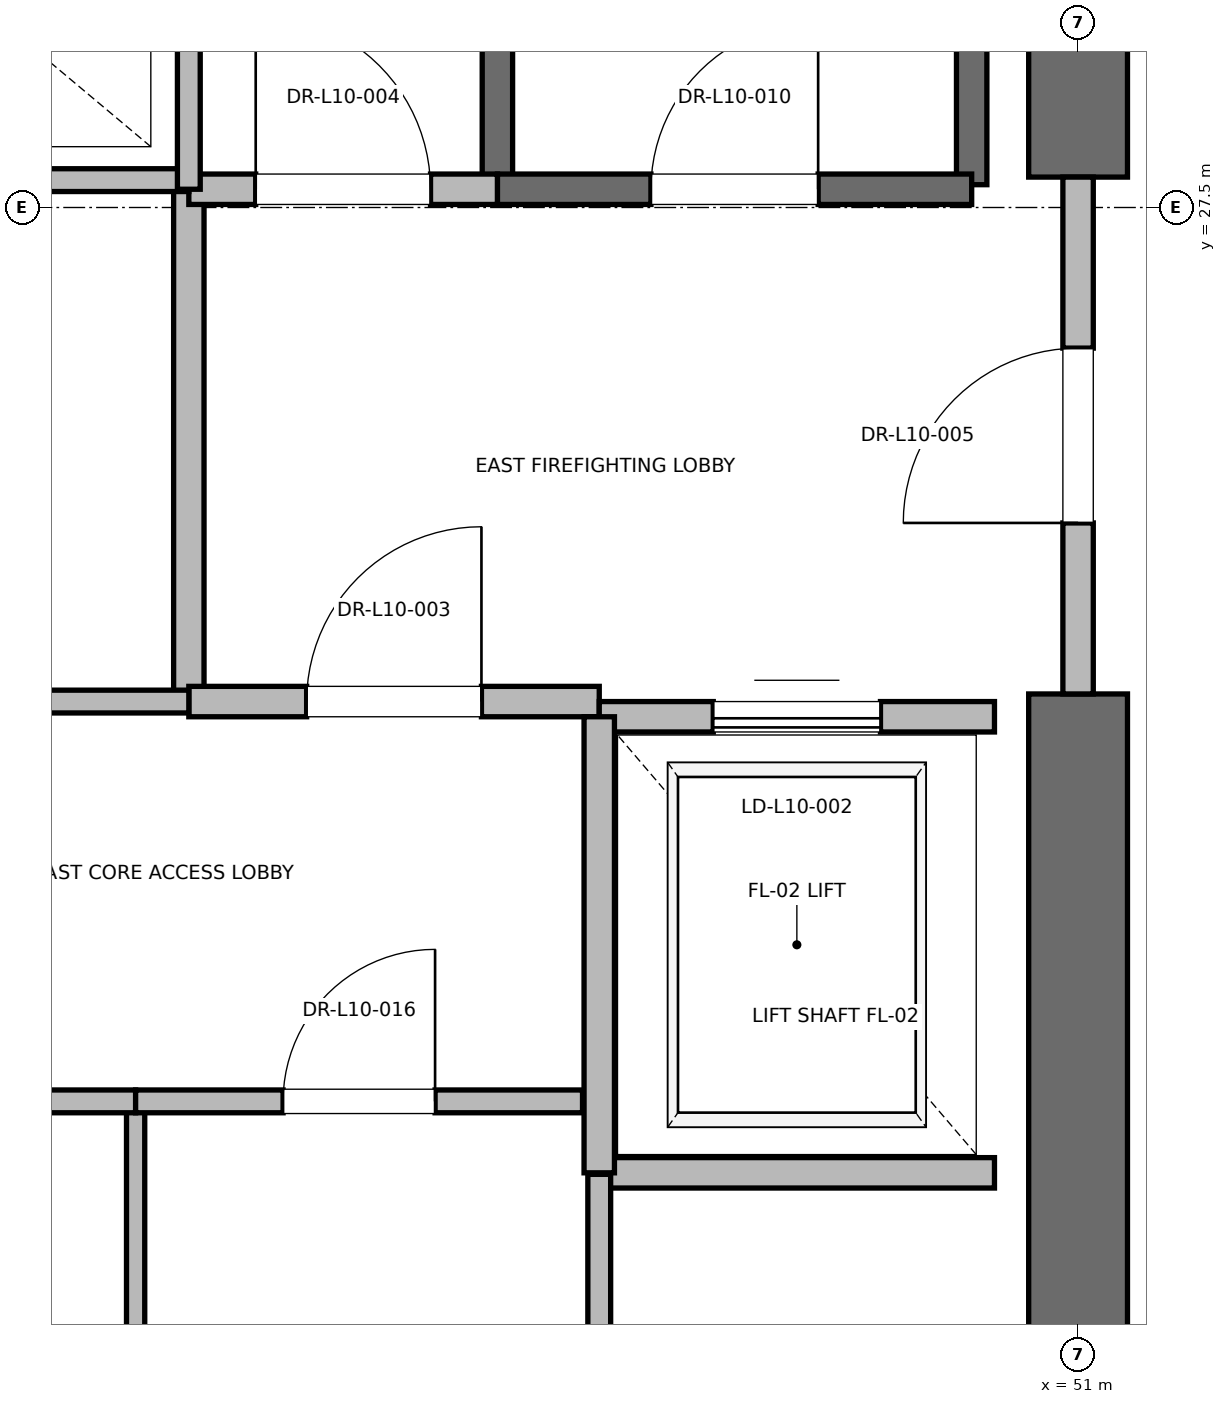
"""IFC4 building model, lengths in metres.
Left out: names, types, materials, properties, quantities, classifications, styles, units other than length and angle.
Written with IfcOpenShell. Run it as: python <this file> out.ifc"""

import sys

from ifc_helpers import new_model, si_unit, direction, frame, frame_2d, origin, place, context, subcontext, project, spatial, rectangle, extrude, element, fill, save


model = new_model("IFC4")
c1 = context("Model", 3, precision=1e-05, world=origin(), true_north=direction((0.0, 1.0)))
c2 = subcontext(c1, "Body", "Model", "MODEL_VIEW")
j1 = project(units=[si_unit("LENGTHUNIT", "METRE"), si_unit("PLANEANGLEUNIT", "RADIAN")], contexts=[c1])
p1 = place(None, origin())
s1 = spatial("IfcSite", under=j1, at=p1, CompositionType="ELEMENT")
p2 = place(p1, origin())
s2 = spatial("IfcBuilding", under=s1, at=p2, CompositionType="ELEMENT")
p3 = place(p2, frame((0.0, 0.0, 47.6)))
s3 = spatial("IfcBuildingStorey", under=s2, at=p3, CompositionType="ELEMENT", Elevation=47.6)
p4 = place(p3, frame((51.0, 18.5, 0.0), z_axis=(0.0, 0.0, 1.0), x_axis=(0.0, 1.0, 0.0)))
e1 = element("IfcWall", 1, at=p4, inside=s3, PredefinedType="SHEAR", context=c2, shape_type="SweptSolid", body=[
    extrude(rectangle(XDim=5.8, YDim=0.65, at=frame_2d((2.9, 0.0))), origin(), (0.0, 0.0, 1.0), 3.76),
])
p5 = place(p3, frame((51.0, 27.7, 0.0), z_axis=(0.0, 0.0, 1.0), x_axis=(0.0, 1.0, 0.0)))
e2 = element("IfcWall", 2, at=p5, inside=s3, PredefinedType="SHEAR", context=c2, shape_type="SweptSolid", body=[
    extrude(rectangle(XDim=8.8, YDim=0.65, at=frame_2d((4.4, 0.0))), origin(), (0.0, 0.0, 1.0), 3.76),
])
p6 = place(p3, frame((50.3, 27.65, 0.0), z_axis=(0.0, 0.0, 1.0), x_axis=(0.0, 1.0, 0.0)))
e3 = element("IfcWall", 3, at=p6, inside=s3, PredefinedType="SOLIDWALL", context=c2, shape_type="SweptSolid", body=[
    extrude(rectangle(XDim=8.15, YDim=0.2, at=frame_2d((4.075, 0.0))), origin(), (0.0, 0.0, 1.0), 3.76),
])
p7 = place(p3, frame((47.18, 27.62, 0.0), z_axis=(0.0, 0.0, 1.0), x_axis=(0.0, 1.0, 0.0)))
e4 = element("IfcWall", 4, at=p7, inside=s3, PredefinedType="SOLIDWALL", context=c2, shape_type="SweptSolid", body=[
    extrude(rectangle(XDim=8.18, YDim=0.2, at=frame_2d((4.09, 0.0))), origin(), (0.0, 0.0, 1.0), 3.76),
])
p8 = place(p3, frame((47.18, 27.62, 0.0), z_axis=(0.0, 0.0, 1.0), x_axis=(1.0, 0.0, 0.0)))
e5 = element("IfcWall", 5, at=p8, inside=s3, PredefinedType="SOLIDWALL", context=c2, shape_type="SweptSolid", body=[
    extrude(rectangle(XDim=3.12, YDim=0.2, at=frame_2d((1.56, 0.0))), origin(), (0.0, 0.0, 1.0), 3.76),
])
p9 = place(p8, frame((1.01, 0.0, 0.0)))
e6 = element("IfcOpeningElement", 6, at=p9, cuts=e5, PredefinedType="OPENING", context=c2, shape_type="SweptSolid", body=[
    extrude(rectangle(XDim=1.1, YDim=2.15, at=frame_2d((0.55, 1.075))), frame((0.0, 0.1, 0.0), z_axis=(0.0, -1.0, 0.0), x_axis=(1.0, 0.0, 0.0)), (0.0, 0.0, 1.0), 0.2),
])
p10 = place(p3, frame((45.15, 24.25, 0.0), z_axis=(0.0, 0.0, 1.0), x_axis=(0.0, 1.0, 0.0)))
e7 = element("IfcWall", 7, at=p10, inside=s3, PredefinedType="PARTITIONING", context=c2, shape_type="SweptSolid", body=[
    extrude(rectangle(XDim=3.37, YDim=0.2, at=frame_2d((1.685, 0.0))), origin(), (0.0, 0.0, 1.0), 3.76),
])
p11 = place(p3, frame((45.15, 24.25, 0.0), z_axis=(0.0, 0.0, 1.0), x_axis=(1.0, 0.0, 0.0)))
e8 = element("IfcWall", 8, at=p11, inside=s3, PredefinedType="PARTITIONING", context=c2, shape_type="SweptSolid", body=[
    extrude(rectangle(XDim=2.7, YDim=0.2, at=frame_2d((1.35, 0.0))), origin(), (0.0, 0.0, 1.0), 3.76),
])
p12 = place(p11, frame((0.775, 0.0, 0.0)))
e9 = element("IfcOpeningElement", 9, at=p12, cuts=e8, PredefinedType="OPENING", context=c2, shape_type="SweptSolid", body=[
    extrude(rectangle(XDim=1.15, YDim=2.2, at=frame_2d((0.575, 1.1))), frame((0.0, 0.1, 0.0), z_axis=(0.0, -1.0, 0.0), x_axis=(1.0, 0.0, 0.0)), (0.0, 0.0, 1.0), 0.2),
])
p13 = place(p3, frame((45.15, 27.62, 0.0), z_axis=(0.0, 0.0, 1.0), x_axis=(1.0, 0.0, 0.0)))
e10 = element("IfcWall", 10, at=p13, inside=s3, PredefinedType="PARTITIONING", context=c2, shape_type="SweptSolid", body=[
    extrude(rectangle(XDim=2.03, YDim=0.2, at=frame_2d((1.015, 0.0))), origin(), (0.0, 0.0, 1.0), 3.76),
])
p14 = place(p13, frame((0.44, 0.0, 0.0)))
e11 = element("IfcOpeningElement", 11, at=p14, cuts=e10, PredefinedType="OPENING", context=c2, shape_type="SweptSolid", body=[
    extrude(rectangle(XDim=1.15, YDim=2.2, at=frame_2d((0.575, 1.1))), frame((0.0, 0.1, 0.0), z_axis=(0.0, -1.0, 0.0), x_axis=(1.0, 0.0, 0.0)), (0.0, 0.0, 1.0), 0.2),
])
p15 = place(p3, frame((51.0, 24.3, 0.0), z_axis=(0.0, 0.0, 1.0), x_axis=(0.0, 1.0, 0.0)))
e12 = element("IfcWall", 12, at=p15, inside=s3, PredefinedType="PARTITIONING", context=c2, shape_type="SweptSolid", body=[
    extrude(rectangle(XDim=3.4, YDim=0.2, at=frame_2d((1.7, 0.0))), origin(), (0.0, 0.0, 1.0), 2.54),
])
p16 = place(p15, frame((1.125, 0.0, 0.0)))
e13 = element("IfcOpeningElement", 13, at=p16, cuts=e12, PredefinedType="OPENING", context=c2, shape_type="SweptSolid", body=[
    extrude(rectangle(XDim=1.15, YDim=2.2, at=frame_2d((0.575, 1.1))), frame((0.0, 0.1, 0.0), z_axis=(0.0, -1.0, 0.0), x_axis=(1.0, 0.0, 0.0)), (0.0, 0.0, 1.0), 0.2),
])
p17 = place(p3, frame((47.85, 21.15, 0.0), z_axis=(0.0, 0.0, 1.0), x_axis=(1.0, 0.0, 0.0)))
e14 = element("IfcWall", 14, at=p17, inside=s3, PredefinedType="SOLIDWALL", context=c2, shape_type="SweptSolid", body=[
    extrude(rectangle(XDim=2.6, YDim=0.2, at=frame_2d((1.3, 0.0))), origin(), (0.0, 0.0, 1.0), 3.76),
])
p18 = place(p3, frame((50.45, 24.15, 0.0), z_axis=(0.0, 0.0, 1.0), x_axis=(-1.0, 0.0, 0.0)))
e15 = element("IfcWall", 15, at=p18, inside=s3, PredefinedType="SOLIDWALL", context=c2, shape_type="SweptSolid", body=[
    extrude(rectangle(XDim=2.6, YDim=0.2, at=frame_2d((1.3, 0.0))), origin(), (0.0, 0.0, 1.0), 2.54),
])
p19 = place(p18, frame((0.75, 0.0, 0.0)))
e16 = element("IfcOpeningElement", 16, at=p19, cuts=e15, PredefinedType="OPENING", context=c2, shape_type="SweptSolid", body=[
    extrude(rectangle(XDim=1.1, YDim=2.2, at=frame_2d((0.55, 1.1))), frame((0.0, 0.1, 0.0), z_axis=(0.0, -1.0, 0.0), x_axis=(1.0, 0.0, 0.0)), (0.0, 0.0, 1.0), 0.2),
])
p20 = place(p3, frame((47.85, 24.15, 0.0), z_axis=(0.0, 0.0, 1.0), x_axis=(0.0, -1.0, 0.0)))
e17 = element("IfcWall", 17, at=p20, inside=s3, PredefinedType="SOLIDWALL", context=c2, shape_type="SweptSolid", body=[
    extrude(rectangle(XDim=3.0, YDim=0.2, at=frame_2d((1.5, 0.0))), origin(), (0.0, 0.0, 1.0), 3.76),
])
p21 = place(p3, frame((41.56, 27.68, 0.0), z_axis=(0.0, 0.0, 1.0), x_axis=(1.0, 0.0, 0.0)))
e18 = element("IfcWall", 18, at=p21, inside=s3, PredefinedType="PARTITIONING", context=c2, shape_type="SweptSolid", body=[
    extrude(rectangle(XDim=3.59, YDim=0.15, at=frame_2d((1.795, 0.0))), origin(), (0.0, 0.0, 1.0), 2.85),
])
p22 = place(p3, frame((47.85, 18.6, 0.0), z_axis=(0.0, 0.0, 1.0), x_axis=(0.0, 1.0, 0.0)))
e19 = element("IfcWall", 19, at=p22, inside=s3, PredefinedType="PARTITIONING", context=c2, shape_type="SweptSolid", body=[
    extrude(rectangle(XDim=2.54, YDim=0.15, at=frame_2d((1.27, 0.0))), origin(), (0.0, 0.0, 1.0), 2.85),
])
p23 = place(p3, frame((44.8, 18.6, 0.0), z_axis=(0.0, 0.0, 1.0), x_axis=(0.0, 1.0, 0.0)))
e20 = element("IfcWall", 20, at=p23, inside=s3, PredefinedType="PARTITIONING", context=c2, shape_type="SweptSolid", body=[
    extrude(rectangle(XDim=3.02, YDim=0.12, at=frame_2d((1.51, 0.0))), origin(), (0.0, 0.0, 1.0), 2.85),
])
p24 = place(p3, frame((41.76, 21.62, 0.0), z_axis=(0.0, 0.0, 1.0), x_axis=(1.0, 0.0, 0.0)))
e21 = element("IfcWall", 21, at=p24, inside=s3, PredefinedType="PARTITIONING", context=c2, shape_type="SweptSolid", body=[
    extrude(rectangle(XDim=3.04, YDim=0.15, at=frame_2d((1.52, 0.0))), origin(), (0.0, 0.0, 1.0), 2.85),
])
p25 = place(p24, frame((1.02, 0.0, 0.0)))
e22 = element("IfcOpeningElement", 22, at=p25, cuts=e21, PredefinedType="OPENING", context=c2, shape_type="SweptSolid", body=[
    extrude(rectangle(XDim=1.0, YDim=2.15, at=frame_2d((0.5, 1.075))), frame((0.0, 0.075, 0.0), z_axis=(0.0, -1.0, 0.0), x_axis=(1.0, 0.0, 0.0)), (0.0, 0.0, 1.0), 0.15),
])
p26 = place(p3, frame((44.8, 21.62, 0.0), z_axis=(0.0, 0.0, 1.0), x_axis=(1.0, 0.0, 0.0)))
e23 = element("IfcWall", 23, at=p26, inside=s3, PredefinedType="PARTITIONING", context=c2, shape_type="SweptSolid", body=[
    extrude(rectangle(XDim=2.94, YDim=0.15, at=frame_2d((1.47, 0.0))), origin(), (0.0, 0.0, 1.0), 2.85),
])
p27 = place(p26, frame((0.97, 0.0, 0.0)))
e24 = element("IfcOpeningElement", 24, at=p27, cuts=e23, PredefinedType="OPENING", context=c2, shape_type="SweptSolid", body=[
    extrude(rectangle(XDim=1.0, YDim=2.15, at=frame_2d((0.5, 1.075))), frame((0.0, 0.075, 0.0), z_axis=(0.0, -1.0, 0.0), x_axis=(1.0, 0.0, 0.0)), (0.0, 0.0, 1.0), 0.15),
])
p28 = place(p3, frame((41.76, 24.25, 0.0), z_axis=(0.0, 0.0, 1.0), x_axis=(1.0, 0.0, 0.0)))
e25 = element("IfcWall", 25, at=p28, inside=s3, PredefinedType="PARTITIONING", context=c2, shape_type="SweptSolid", body=[
    extrude(rectangle(XDim=3.39, YDim=0.15, at=frame_2d((1.695, 0.0))), origin(), (0.0, 0.0, 1.0), 2.85),
])
p29 = place(p28, frame((1.255, 0.0, 0.0)))
e26 = element("IfcOpeningElement", 26, at=p29, cuts=e25, PredefinedType="OPENING", context=c2, shape_type="SweptSolid", body=[
    extrude(rectangle(XDim=0.88, YDim=2.1, at=frame_2d((0.44, 1.05))), frame((0.0, 0.075, 0.0), z_axis=(0.0, -1.0, 0.0), x_axis=(1.0, 0.0, 0.0)), (0.0, 0.0, 1.0), 0.15),
])
p30 = place(p3, frame((45.15, 27.62, 0.0), z_axis=(0.0, 0.0, 1.0), x_axis=(0.0, 1.0, 0.0)))
e27 = element("IfcWall", 27, at=p30, inside=s3, PredefinedType="PARTITIONING", context=c2, shape_type="SweptSolid", body=[
    extrude(rectangle(XDim=3.1, YDim=0.15, at=frame_2d((1.55, 0.0))), origin(), (0.0, 0.0, 1.0), 2.85),
])
p31 = place(p9, origin())
e28 = element("IfcDoor", 28, at=p31, inside=s3, OperationType="SINGLE_SWING_RIGHT", PredefinedType="DOOR", context=c2, shape_type="SweptSolid", body=[
    extrude(rectangle(XDim=1.1, YDim=2.15, at=frame_2d((0.55, 1.075))), frame((0.0, 0.025, 0.0), z_axis=(0.0, -1.0, 0.0), x_axis=(1.0, 0.0, 0.0)), (0.0, 0.0, 1.0), 0.05),
])
fill(e6, e28)
p32 = place(p12, origin())
e29 = element("IfcDoor", 29, at=p32, inside=s3, OperationType="SINGLE_SWING_RIGHT", PredefinedType="DOOR", context=c2, shape_type="SweptSolid", body=[
    extrude(rectangle(XDim=1.15, YDim=2.2, at=frame_2d((0.575, 1.1))), frame((0.0, 0.025, 0.0), z_axis=(0.0, -1.0, 0.0), x_axis=(1.0, 0.0, 0.0)), (0.0, 0.0, 1.0), 0.05),
])
fill(e9, e29)
p33 = place(p14, origin())
e30 = element("IfcDoor", 30, at=p33, inside=s3, OperationType="SINGLE_SWING_LEFT", PredefinedType="DOOR", context=c2, shape_type="SweptSolid", body=[
    extrude(rectangle(XDim=1.15, YDim=2.2, at=frame_2d((0.575, 1.1))), frame((0.0, 0.025, 0.0), z_axis=(0.0, -1.0, 0.0), x_axis=(1.0, 0.0, 0.0)), (0.0, 0.0, 1.0), 0.05),
])
fill(e11, e30)
p34 = place(p16, origin())
e31 = element("IfcDoor", 31, at=p34, inside=s3, OperationType="SINGLE_SWING_LEFT", PredefinedType="DOOR", context=c2, shape_type="SweptSolid", body=[
    extrude(rectangle(XDim=1.15, YDim=2.2, at=frame_2d((0.575, 1.1))), frame((0.0, 0.025, 0.0), z_axis=(0.0, -1.0, 0.0), x_axis=(1.0, 0.0, 0.0)), (0.0, 0.0, 1.0), 0.05),
])
fill(e13, e31)
p35 = place(p19, origin())
e32 = element("IfcDoor", 32, at=p35, inside=s3, OperationType="SLIDING_TO_RIGHT", PredefinedType="DOOR", context=c2, shape_type="SweptSolid", body=[
    extrude(rectangle(XDim=1.1, YDim=2.2, at=frame_2d((0.55, 1.1))), frame((0.0, 0.025, 0.0), z_axis=(0.0, -1.0, 0.0), x_axis=(1.0, 0.0, 0.0)), (0.0, 0.0, 1.0), 0.05),
])
fill(e16, e32)
p36 = place(p27, origin())
e33 = element("IfcDoor", 33, at=p36, inside=s3, OperationType="SINGLE_SWING_RIGHT", PredefinedType="DOOR", context=c2, shape_type="SweptSolid", body=[
    extrude(rectangle(XDim=1.0, YDim=2.15, at=frame_2d((0.5, 1.075))), frame((0.0, 0.025, 0.0), z_axis=(0.0, -1.0, 0.0), x_axis=(1.0, 0.0, 0.0)), (0.0, 0.0, 1.0), 0.05),
])
fill(e24, e33)
save(model, sys.argv[1])
